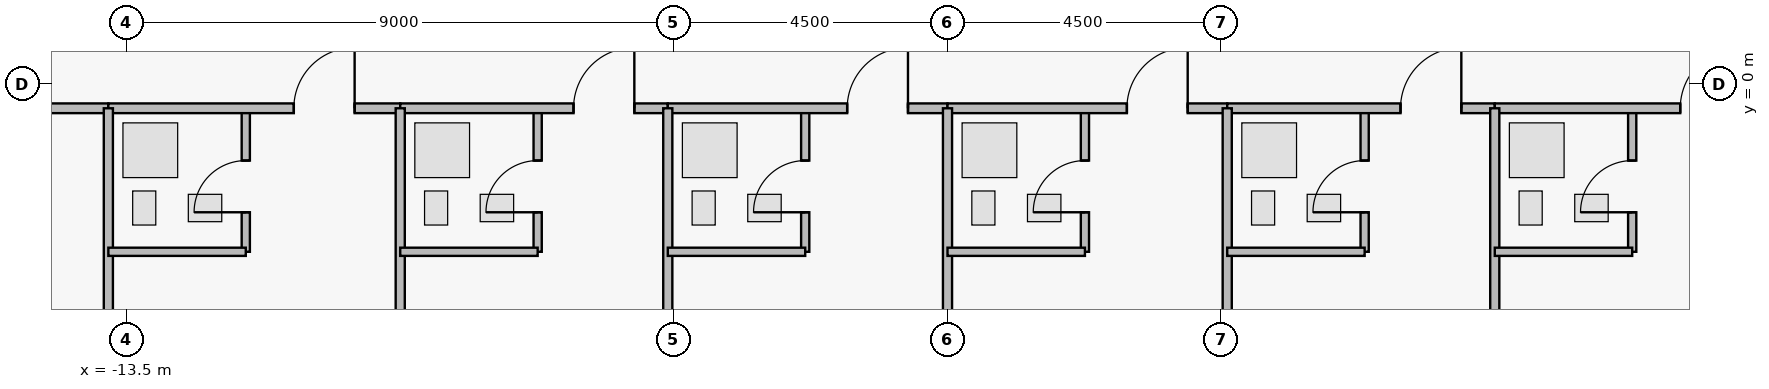
"""IFC4 building model, lengths in metres.
Left out: names, types, materials, properties, quantities, classifications, styles, units other than length and angle.
Written with IfcOpenShell. Run it as: python <this file> out.ifc"""

import sys

from ifc_helpers import new_model, si_unit, direction, frame, frame_2d, origin, place, context, subcontext, project, spatial, rectangle, extrude, element, fill, save


model = new_model("IFC4")
c1 = context("Model", 3, precision=1e-05, world=origin(), true_north=direction((0.0, 1.0)))
c2 = subcontext(c1, "Body", "Model", "MODEL_VIEW")
j1 = project(units=[si_unit("LENGTHUNIT", "METRE"), si_unit("PLANEANGLEUNIT", "RADIAN")], contexts=[c1])
p1 = place(None, origin())
s1 = spatial("IfcSite", under=j1, at=p1, CompositionType="ELEMENT")
p2 = place(p1, origin())
s2 = spatial("IfcBuilding", under=s1, at=p2, CompositionType="ELEMENT")
p3 = place(p2, frame((0.0, 0.0, 60.45)))
s3 = spatial("IfcBuildingStorey", under=s2, at=p3, CompositionType="ELEMENT", Elevation=60.45)
p4 = place(p3, frame((-19.64, -0.4, 0.0), z_axis=(0.0, 0.0, 1.0), x_axis=(1.0, 0.0, 0.0)))
e1 = element("IfcWall", 1, at=p4, inside=s3, PredefinedType="PARTITIONING", context=c2, shape_type="SweptSolid", body=[
    extrude(rectangle(XDim=5.84, YDim=0.16, at=frame_2d((2.92, 0.0))), origin(), (0.0, 0.0, 1.0), 3.43),
])
p5 = place(p4, frame((3.57, 0.0, 0.0)))
e2 = element("IfcOpeningElement", 2, at=p5, cuts=e1, PredefinedType="OPENING", context=c2, shape_type="SweptSolid", body=[
    extrude(rectangle(XDim=1.0, YDim=2.15, at=frame_2d((0.5, 1.075))), frame((0.0, 0.09, 0.0), z_axis=(0.0, -1.0, 0.0), x_axis=(1.0, 0.0, 0.0)), (0.0, 0.0, 1.0), 0.18),
])
p6 = place(p3, frame((-11.54, -2.76, 0.0), z_axis=(0.0, 0.0, 1.0), x_axis=(0.0, 1.0, 0.0)))
e3 = element("IfcWall", 3, at=p6, inside=s3, PredefinedType="PLUMBINGWALL", context=c2, shape_type="SweptSolid", body=[
    extrude(rectangle(XDim=2.36, YDim=0.135, at=frame_2d((1.18, 0.0))), origin(), (0.0, 0.0, 1.0), 3.43),
])
p7 = place(p6, frame((0.65, 0.0, 0.0)))
e4 = element("IfcOpeningElement", 4, at=p7, cuts=e3, PredefinedType="OPENING", context=c2, shape_type="SweptSolid", body=[
    extrude(rectangle(XDim=0.85, YDim=2.1, at=frame_2d((0.425, 1.05))), frame((0.0, 0.077, 0.0), z_axis=(0.0, -1.0, 0.0), x_axis=(1.0, 0.0, 0.0)), (0.0, 0.0, 1.0), 0.155),
])
p8 = place(p3, frame((-13.8, -0.4, 0.0), z_axis=(0.0, 0.0, 1.0), x_axis=(1.0, 0.0, 0.0)))
e5 = element("IfcWall", 5, at=p8, inside=s3, PredefinedType="PARTITIONING", context=c2, shape_type="SweptSolid", body=[
    extrude(rectangle(XDim=4.8, YDim=0.16, at=frame_2d((2.4, 0.0))), origin(), (0.0, 0.0, 1.0), 3.43),
])
p9 = place(p8, frame((3.05, 0.0, 0.0)))
e6 = element("IfcOpeningElement", 6, at=p9, cuts=e5, PredefinedType="OPENING", context=c2, shape_type="SweptSolid", body=[
    extrude(rectangle(XDim=1.0, YDim=2.15, at=frame_2d((0.5, 1.075))), frame((0.0, 0.09, 0.0), z_axis=(0.0, -1.0, 0.0), x_axis=(1.0, 0.0, 0.0)), (0.0, 0.0, 1.0), 0.18),
])
p10 = place(p3, frame((-6.74, -2.76, 0.0), z_axis=(0.0, 0.0, 1.0), x_axis=(0.0, 1.0, 0.0)))
e7 = element("IfcWall", 7, at=p10, inside=s3, PredefinedType="PLUMBINGWALL", context=c2, shape_type="SweptSolid", body=[
    extrude(rectangle(XDim=2.36, YDim=0.135, at=frame_2d((1.18, 0.0))), origin(), (0.0, 0.0, 1.0), 3.43),
])
p11 = place(p10, frame((0.65, 0.0, 0.0)))
e8 = element("IfcOpeningElement", 8, at=p11, cuts=e7, PredefinedType="OPENING", context=c2, shape_type="SweptSolid", body=[
    extrude(rectangle(XDim=0.85, YDim=2.1, at=frame_2d((0.425, 1.05))), frame((0.0, 0.077, 0.0), z_axis=(0.0, -1.0, 0.0), x_axis=(1.0, 0.0, 0.0)), (0.0, 0.0, 1.0), 0.155),
])
p12 = place(p3, frame((-9.0, -0.4, 0.0), z_axis=(0.0, 0.0, 1.0), x_axis=(1.0, 0.0, 0.0)))
e9 = element("IfcWall", 9, at=p12, inside=s3, PredefinedType="PARTITIONING", context=c2, shape_type="SweptSolid", body=[
    extrude(rectangle(XDim=4.4, YDim=0.16, at=frame_2d((2.2, 0.0))), origin(), (0.0, 0.0, 1.0), 3.43),
])
p13 = place(p12, frame((2.85, 0.0, 0.0)))
e10 = element("IfcOpeningElement", 10, at=p13, cuts=e9, PredefinedType="OPENING", context=c2, shape_type="SweptSolid", body=[
    extrude(rectangle(XDim=1.0, YDim=2.15, at=frame_2d((0.5, 1.075))), frame((0.0, 0.09, 0.0), z_axis=(0.0, -1.0, 0.0), x_axis=(1.0, 0.0, 0.0)), (0.0, 0.0, 1.0), 0.18),
])
p14 = place(p3, frame((-2.34, -2.76, 0.0), z_axis=(0.0, 0.0, 1.0), x_axis=(0.0, 1.0, 0.0)))
e11 = element("IfcWall", 11, at=p14, inside=s3, PredefinedType="PLUMBINGWALL", context=c2, shape_type="SweptSolid", body=[
    extrude(rectangle(XDim=2.36, YDim=0.135, at=frame_2d((1.18, 0.0))), origin(), (0.0, 0.0, 1.0), 3.43),
])
p15 = place(p14, frame((0.65, 0.0, 0.0)))
e12 = element("IfcOpeningElement", 12, at=p15, cuts=e11, PredefinedType="OPENING", context=c2, shape_type="SweptSolid", body=[
    extrude(rectangle(XDim=0.85, YDim=2.1, at=frame_2d((0.425, 1.05))), frame((0.0, 0.077, 0.0), z_axis=(0.0, -1.0, 0.0), x_axis=(1.0, 0.0, 0.0)), (0.0, 0.0, 1.0), 0.155),
])
p16 = place(p3, frame((-4.6, -0.4, 0.0), z_axis=(0.0, 0.0, 1.0), x_axis=(1.0, 0.0, 0.0)))
e13 = element("IfcWall", 13, at=p16, inside=s3, PredefinedType="PARTITIONING", context=c2, shape_type="SweptSolid", body=[
    extrude(rectangle(XDim=4.6, YDim=0.16, at=frame_2d((2.3, 0.0))), origin(), (0.0, 0.0, 1.0), 3.43),
])
p17 = place(p16, frame((2.95, 0.0, 0.0)))
e14 = element("IfcOpeningElement", 14, at=p17, cuts=e13, PredefinedType="OPENING", context=c2, shape_type="SweptSolid", body=[
    extrude(rectangle(XDim=1.0, YDim=2.15, at=frame_2d((0.5, 1.075))), frame((0.0, 0.09, 0.0), z_axis=(0.0, -1.0, 0.0), x_axis=(1.0, 0.0, 0.0)), (0.0, 0.0, 1.0), 0.18),
])
p18 = place(p3, frame((2.26, -2.76, 0.0), z_axis=(0.0, 0.0, 1.0), x_axis=(0.0, 1.0, 0.0)))
e15 = element("IfcWall", 15, at=p18, inside=s3, PredefinedType="PLUMBINGWALL", context=c2, shape_type="SweptSolid", body=[
    extrude(rectangle(XDim=2.36, YDim=0.135, at=frame_2d((1.18, 0.0))), origin(), (0.0, 0.0, 1.0), 3.43),
])
p19 = place(p18, frame((0.65, 0.0, 0.0)))
e16 = element("IfcOpeningElement", 16, at=p19, cuts=e15, PredefinedType="OPENING", context=c2, shape_type="SweptSolid", body=[
    extrude(rectangle(XDim=0.85, YDim=2.1, at=frame_2d((0.425, 1.05))), frame((0.0, 0.077, 0.0), z_axis=(0.0, -1.0, 0.0), x_axis=(1.0, 0.0, 0.0)), (0.0, 0.0, 1.0), 0.155),
])
p20 = place(p3, frame((0.0, -0.4, 0.0), z_axis=(0.0, 0.0, 1.0), x_axis=(1.0, 0.0, 0.0)))
e17 = element("IfcWall", 17, at=p20, inside=s3, PredefinedType="PARTITIONING", context=c2, shape_type="SweptSolid", body=[
    extrude(rectangle(XDim=4.6, YDim=0.16, at=frame_2d((2.3, 0.0))), origin(), (0.0, 0.0, 1.0), 3.43),
])
p21 = place(p20, frame((2.95, 0.0, 0.0)))
e18 = element("IfcOpeningElement", 18, at=p21, cuts=e17, PredefinedType="OPENING", context=c2, shape_type="SweptSolid", body=[
    extrude(rectangle(XDim=1.0, YDim=2.15, at=frame_2d((0.5, 1.075))), frame((0.0, 0.09, 0.0), z_axis=(0.0, -1.0, 0.0), x_axis=(1.0, 0.0, 0.0)), (0.0, 0.0, 1.0), 0.18),
])
p22 = place(p3, frame((6.86, -2.76, 0.0), z_axis=(0.0, 0.0, 1.0), x_axis=(0.0, 1.0, 0.0)))
e19 = element("IfcWall", 19, at=p22, inside=s3, PredefinedType="PLUMBINGWALL", context=c2, shape_type="SweptSolid", body=[
    extrude(rectangle(XDim=2.36, YDim=0.135, at=frame_2d((1.18, 0.0))), origin(), (0.0, 0.0, 1.0), 3.43),
])
p23 = place(p22, frame((0.65, 0.0, 0.0)))
e20 = element("IfcOpeningElement", 20, at=p23, cuts=e19, PredefinedType="OPENING", context=c2, shape_type="SweptSolid", body=[
    extrude(rectangle(XDim=0.85, YDim=2.1, at=frame_2d((0.425, 1.05))), frame((0.0, 0.077, 0.0), z_axis=(0.0, -1.0, 0.0), x_axis=(1.0, 0.0, 0.0)), (0.0, 0.0, 1.0), 0.155),
])
p24 = place(p3, frame((4.6, -0.4, 0.0), z_axis=(0.0, 0.0, 1.0), x_axis=(1.0, 0.0, 0.0)))
e21 = element("IfcWall", 21, at=p24, inside=s3, PredefinedType="PARTITIONING", context=c2, shape_type="SweptSolid", body=[
    extrude(rectangle(XDim=4.4, YDim=0.16, at=frame_2d((2.2, 0.0))), origin(), (0.0, 0.0, 1.0), 3.43),
])
p25 = place(p24, frame((2.85, 0.0, 0.0)))
e22 = element("IfcOpeningElement", 22, at=p25, cuts=e21, PredefinedType="OPENING", context=c2, shape_type="SweptSolid", body=[
    extrude(rectangle(XDim=1.0, YDim=2.15, at=frame_2d((0.5, 1.075))), frame((0.0, 0.09, 0.0), z_axis=(0.0, -1.0, 0.0), x_axis=(1.0, 0.0, 0.0)), (0.0, 0.0, 1.0), 0.18),
])
p26 = place(p3, frame((11.26, -2.76, 0.0), z_axis=(0.0, 0.0, 1.0), x_axis=(0.0, 1.0, 0.0)))
e23 = element("IfcWall", 23, at=p26, inside=s3, PredefinedType="PLUMBINGWALL", context=c2, shape_type="SweptSolid", body=[
    extrude(rectangle(XDim=2.36, YDim=0.135, at=frame_2d((1.18, 0.0))), origin(), (0.0, 0.0, 1.0), 3.43),
])
p27 = place(p26, frame((0.65, 0.0, 0.0)))
e24 = element("IfcOpeningElement", 24, at=p27, cuts=e23, PredefinedType="OPENING", context=c2, shape_type="SweptSolid", body=[
    extrude(rectangle(XDim=0.85, YDim=2.1, at=frame_2d((0.425, 1.05))), frame((0.0, 0.077, 0.0), z_axis=(0.0, -1.0, 0.0), x_axis=(1.0, 0.0, 0.0)), (0.0, 0.0, 1.0), 0.155),
])
p28 = place(p3, frame((9.0, -0.4, 0.0), z_axis=(0.0, 0.0, 1.0), x_axis=(1.0, 0.0, 0.0)))
e25 = element("IfcWall", 25, at=p28, inside=s3, PredefinedType="PARTITIONING", context=c2, shape_type="SweptSolid", body=[
    extrude(rectangle(XDim=4.8, YDim=0.16, at=frame_2d((2.4, 0.0))), origin(), (0.0, 0.0, 1.0), 3.43),
])
p29 = place(p28, frame((3.05, 0.0, 0.0)))
e26 = element("IfcOpeningElement", 26, at=p29, cuts=e25, PredefinedType="OPENING", context=c2, shape_type="SweptSolid", body=[
    extrude(rectangle(XDim=1.0, YDim=2.15, at=frame_2d((0.5, 1.075))), frame((0.0, 0.09, 0.0), z_axis=(0.0, -1.0, 0.0), x_axis=(1.0, 0.0, 0.0)), (0.0, 0.0, 1.0), 0.18),
])
p30 = place(p3, frame((-13.8, -23.02, 0.0), z_axis=(0.0, 0.0, 1.0), x_axis=(0.0, 1.0, 0.0)))
e27 = element("IfcWall", 27, at=p30, inside=s3, PredefinedType="PARTITIONING", context=c2, shape_type="SweptSolid", body=[
    extrude(rectangle(XDim=22.62, YDim=0.15, at=frame_2d((11.31, 0.0))), origin(), (0.0, 0.0, 1.0), 2.668),
])
p31 = place(p3, frame((-13.8, -2.76, 0.0), z_axis=(0.0, 0.0, 1.0), x_axis=(1.0, 0.0, 0.0)))
e28 = element("IfcWall", 28, at=p31, inside=s3, PredefinedType="PLUMBINGWALL", context=c2, shape_type="SweptSolid", body=[
    extrude(rectangle(XDim=2.26, YDim=0.135, at=frame_2d((1.13, 0.0))), origin(), (0.0, 0.0, 1.0), 3.43),
])
p32 = place(p3, frame((-9.0, -23.02, 0.0), z_axis=(0.0, 0.0, 1.0), x_axis=(0.0, 1.0, 0.0)))
e29 = element("IfcWall", 29, at=p32, inside=s3, PredefinedType="PARTITIONING", context=c2, shape_type="SweptSolid", body=[
    extrude(rectangle(XDim=22.62, YDim=0.15, at=frame_2d((11.31, 0.0))), origin(), (0.0, 0.0, 1.0), 3.43),
])
p33 = place(p3, frame((-9.0, -2.76, 0.0), z_axis=(0.0, 0.0, 1.0), x_axis=(1.0, 0.0, 0.0)))
e30 = element("IfcWall", 30, at=p33, inside=s3, PredefinedType="PLUMBINGWALL", context=c2, shape_type="SweptSolid", body=[
    extrude(rectangle(XDim=2.26, YDim=0.135, at=frame_2d((1.13, 0.0))), origin(), (0.0, 0.0, 1.0), 3.43),
])
p34 = place(p3, frame((-4.6, -23.02, 0.0), z_axis=(0.0, 0.0, 1.0), x_axis=(0.0, 1.0, 0.0)))
e31 = element("IfcWall", 31, at=p34, inside=s3, PredefinedType="PARTITIONING", context=c2, shape_type="SweptSolid", body=[
    extrude(rectangle(XDim=22.62, YDim=0.15, at=frame_2d((11.31, 0.0))), origin(), (0.0, 0.0, 1.0), 2.668),
])
p35 = place(p3, frame((-4.6, -2.76, 0.0), z_axis=(0.0, 0.0, 1.0), x_axis=(1.0, 0.0, 0.0)))
e32 = element("IfcWall", 32, at=p35, inside=s3, PredefinedType="PLUMBINGWALL", context=c2, shape_type="SweptSolid", body=[
    extrude(rectangle(XDim=2.26, YDim=0.135, at=frame_2d((1.13, 0.0))), origin(), (0.0, 0.0, 1.0), 3.43),
])
p36 = place(p3, frame((0.0, -23.02, 0.0), z_axis=(0.0, 0.0, 1.0), x_axis=(0.0, 1.0, 0.0)))
e33 = element("IfcWall", 33, at=p36, inside=s3, PredefinedType="PARTITIONING", context=c2, shape_type="SweptSolid", body=[
    extrude(rectangle(XDim=22.62, YDim=0.15, at=frame_2d((11.31, 0.0))), origin(), (0.0, 0.0, 1.0), 3.43),
])
p37 = place(p3, frame((0.0, -2.76, 0.0), z_axis=(0.0, 0.0, 1.0), x_axis=(1.0, 0.0, 0.0)))
e34 = element("IfcWall", 34, at=p37, inside=s3, PredefinedType="PLUMBINGWALL", context=c2, shape_type="SweptSolid", body=[
    extrude(rectangle(XDim=2.26, YDim=0.135, at=frame_2d((1.13, 0.0))), origin(), (0.0, 0.0, 1.0), 3.43),
])
p38 = place(p3, frame((4.6, -23.02, 0.0), z_axis=(0.0, 0.0, 1.0), x_axis=(0.0, 1.0, 0.0)))
e35 = element("IfcWall", 35, at=p38, inside=s3, PredefinedType="PARTITIONING", context=c2, shape_type="SweptSolid", body=[
    extrude(rectangle(XDim=22.62, YDim=0.15, at=frame_2d((11.31, 0.0))), origin(), (0.0, 0.0, 1.0), 2.668),
])
p39 = place(p3, frame((4.6, -2.76, 0.0), z_axis=(0.0, 0.0, 1.0), x_axis=(1.0, 0.0, 0.0)))
e36 = element("IfcWall", 36, at=p39, inside=s3, PredefinedType="PLUMBINGWALL", context=c2, shape_type="SweptSolid", body=[
    extrude(rectangle(XDim=2.26, YDim=0.135, at=frame_2d((1.13, 0.0))), origin(), (0.0, 0.0, 1.0), 3.43),
])
p40 = place(p3, frame((9.0, -23.02, 0.0), z_axis=(0.0, 0.0, 1.0), x_axis=(0.0, 1.0, 0.0)))
e37 = element("IfcWall", 37, at=p40, inside=s3, PredefinedType="PARTITIONING", context=c2, shape_type="SweptSolid", body=[
    extrude(rectangle(XDim=22.62, YDim=0.15, at=frame_2d((11.31, 0.0))), origin(), (0.0, 0.0, 1.0), 3.43),
])
p41 = place(p3, frame((9.0, -2.76, 0.0), z_axis=(0.0, 0.0, 1.0), x_axis=(1.0, 0.0, 0.0)))
e38 = element("IfcWall", 38, at=p41, inside=s3, PredefinedType="PLUMBINGWALL", context=c2, shape_type="SweptSolid", body=[
    extrude(rectangle(XDim=2.26, YDim=0.135, at=frame_2d((1.13, 0.0))), origin(), (0.0, 0.0, 1.0), 3.43),
])
p42 = place(p7, origin())
e39 = element("IfcDoor", 39, at=p42, inside=s3, OperationType="SINGLE_SWING_LEFT", PredefinedType="DOOR", context=c2, shape_type="SweptSolid", body=[
    extrude(rectangle(XDim=0.85, YDim=2.1, at=frame_2d((0.425, 1.05))), frame((0.0, 0.025, 0.0), z_axis=(0.0, -1.0, 0.0), x_axis=(1.0, 0.0, 0.0)), (0.0, 0.0, 1.0), 0.05),
])
fill(e4, e39)
p43 = place(p9, origin())
e40 = element("IfcDoor", 40, at=p43, inside=s3, OperationType="SINGLE_SWING_RIGHT", PredefinedType="DOOR", context=c2, shape_type="SweptSolid", body=[
    extrude(rectangle(XDim=1.0, YDim=2.15, at=frame_2d((0.5, 1.075))), frame((0.0, 0.025, 0.0), z_axis=(0.0, -1.0, 0.0), x_axis=(1.0, 0.0, 0.0)), (0.0, 0.0, 1.0), 0.05),
])
fill(e6, e40)
p44 = place(p11, origin())
e41 = element("IfcDoor", 41, at=p44, inside=s3, OperationType="SINGLE_SWING_LEFT", PredefinedType="DOOR", context=c2, shape_type="SweptSolid", body=[
    extrude(rectangle(XDim=0.85, YDim=2.1, at=frame_2d((0.425, 1.05))), frame((0.0, 0.025, 0.0), z_axis=(0.0, -1.0, 0.0), x_axis=(1.0, 0.0, 0.0)), (0.0, 0.0, 1.0), 0.05),
])
fill(e8, e41)
p45 = place(p13, origin())
e42 = element("IfcDoor", 42, at=p45, inside=s3, OperationType="SINGLE_SWING_RIGHT", PredefinedType="DOOR", context=c2, shape_type="SweptSolid", body=[
    extrude(rectangle(XDim=1.0, YDim=2.15, at=frame_2d((0.5, 1.075))), frame((0.0, 0.025, 0.0), z_axis=(0.0, -1.0, 0.0), x_axis=(1.0, 0.0, 0.0)), (0.0, 0.0, 1.0), 0.05),
])
fill(e10, e42)
p46 = place(p15, origin())
e43 = element("IfcDoor", 43, at=p46, inside=s3, OperationType="SINGLE_SWING_LEFT", PredefinedType="DOOR", context=c2, shape_type="SweptSolid", body=[
    extrude(rectangle(XDim=0.85, YDim=2.1, at=frame_2d((0.425, 1.05))), frame((0.0, 0.025, 0.0), z_axis=(0.0, -1.0, 0.0), x_axis=(1.0, 0.0, 0.0)), (0.0, 0.0, 1.0), 0.05),
])
fill(e12, e43)
p47 = place(p17, origin())
e44 = element("IfcDoor", 44, at=p47, inside=s3, OperationType="SINGLE_SWING_RIGHT", PredefinedType="DOOR", context=c2, shape_type="SweptSolid", body=[
    extrude(rectangle(XDim=1.0, YDim=2.15, at=frame_2d((0.5, 1.075))), frame((0.0, 0.025, 0.0), z_axis=(0.0, -1.0, 0.0), x_axis=(1.0, 0.0, 0.0)), (0.0, 0.0, 1.0), 0.05),
])
fill(e14, e44)
p48 = place(p19, origin())
e45 = element("IfcDoor", 45, at=p48, inside=s3, OperationType="SINGLE_SWING_LEFT", PredefinedType="DOOR", context=c2, shape_type="SweptSolid", body=[
    extrude(rectangle(XDim=0.85, YDim=2.1, at=frame_2d((0.425, 1.05))), frame((0.0, 0.025, 0.0), z_axis=(0.0, -1.0, 0.0), x_axis=(1.0, 0.0, 0.0)), (0.0, 0.0, 1.0), 0.05),
])
fill(e16, e45)
p49 = place(p21, origin())
e46 = element("IfcDoor", 46, at=p49, inside=s3, OperationType="SINGLE_SWING_RIGHT", PredefinedType="DOOR", context=c2, shape_type="SweptSolid", body=[
    extrude(rectangle(XDim=1.0, YDim=2.15, at=frame_2d((0.5, 1.075))), frame((0.0, 0.025, 0.0), z_axis=(0.0, -1.0, 0.0), x_axis=(1.0, 0.0, 0.0)), (0.0, 0.0, 1.0), 0.05),
])
fill(e18, e46)
p50 = place(p23, origin())
e47 = element("IfcDoor", 47, at=p50, inside=s3, OperationType="SINGLE_SWING_LEFT", PredefinedType="DOOR", context=c2, shape_type="SweptSolid", body=[
    extrude(rectangle(XDim=0.85, YDim=2.1, at=frame_2d((0.425, 1.05))), frame((0.0, 0.025, 0.0), z_axis=(0.0, -1.0, 0.0), x_axis=(1.0, 0.0, 0.0)), (0.0, 0.0, 1.0), 0.05),
])
fill(e20, e47)
p51 = place(p25, origin())
e48 = element("IfcDoor", 48, at=p51, inside=s3, OperationType="SINGLE_SWING_RIGHT", PredefinedType="DOOR", context=c2, shape_type="SweptSolid", body=[
    extrude(rectangle(XDim=1.0, YDim=2.15, at=frame_2d((0.5, 1.075))), frame((0.0, 0.025, 0.0), z_axis=(0.0, -1.0, 0.0), x_axis=(1.0, 0.0, 0.0)), (0.0, 0.0, 1.0), 0.05),
])
fill(e22, e48)
p52 = place(p27, origin())
e49 = element("IfcDoor", 49, at=p52, inside=s3, OperationType="SINGLE_SWING_LEFT", PredefinedType="DOOR", context=c2, shape_type="SweptSolid", body=[
    extrude(rectangle(XDim=0.85, YDim=2.1, at=frame_2d((0.425, 1.05))), frame((0.0, 0.025, 0.0), z_axis=(0.0, -1.0, 0.0), x_axis=(1.0, 0.0, 0.0)), (0.0, 0.0, 1.0), 0.05),
])
fill(e24, e49)
p53 = place(p29, origin())
e50 = element("IfcDoor", 50, at=p53, inside=s3, OperationType="SINGLE_SWING_RIGHT", PredefinedType="DOOR", context=c2, shape_type="SweptSolid", body=[
    extrude(rectangle(XDim=1.0, YDim=2.15, at=frame_2d((0.5, 1.075))), frame((0.0, 0.025, 0.0), z_axis=(0.0, -1.0, 0.0), x_axis=(1.0, 0.0, 0.0)), (0.0, 0.0, 1.0), 0.05),
])
fill(e26, e50)
save(model, sys.argv[1])
